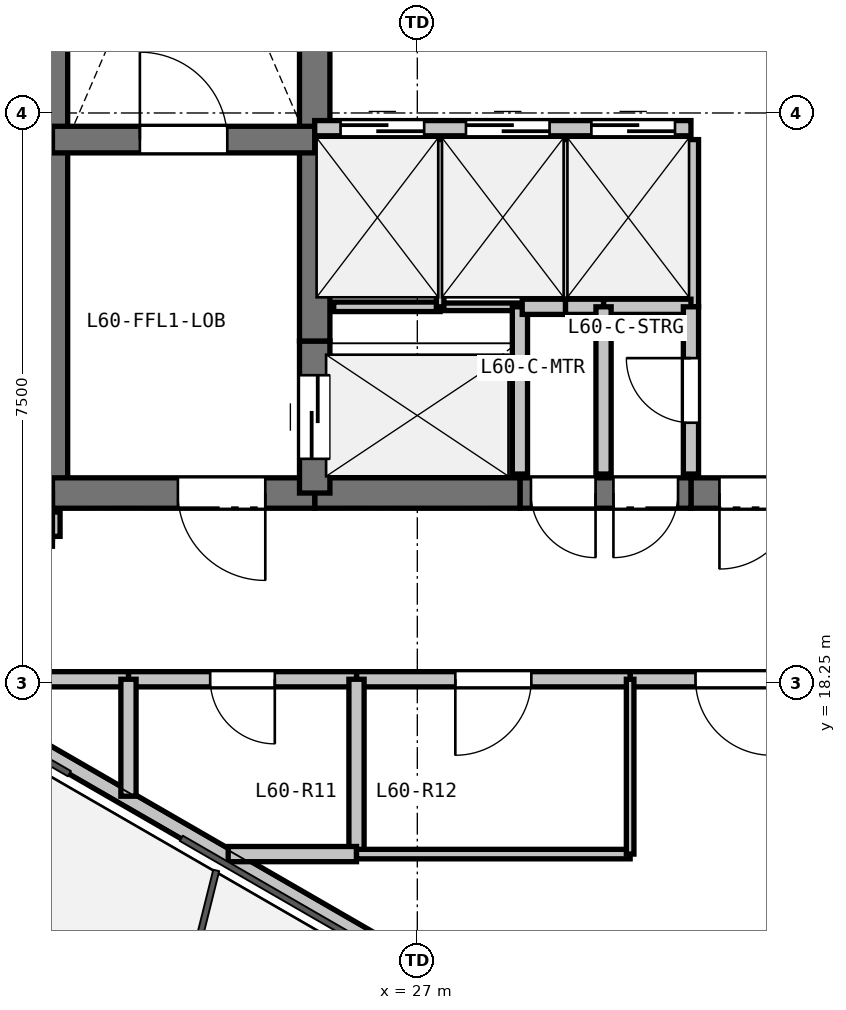
"""IFC4 building model, lengths in metres.
Left out: names, types, materials, properties, quantities, classifications, styles, units other than length and angle.
Written with IfcOpenShell. Run it as: python <this file> out.ifc"""

import sys

from ifc_helpers import new_model, si_unit, direction, frame, frame_2d, origin, place, context, subcontext, project, spatial, rectangle, extrude, element, fill, save


model = new_model("IFC4")
c1 = context("Model", 3, precision=1e-05, world=origin(), true_north=direction((0.0, 1.0)))
c2 = subcontext(c1, "Body", "Model", "MODEL_VIEW")
j1 = project(units=[si_unit("LENGTHUNIT", "METRE"), si_unit("PLANEANGLEUNIT", "RADIAN")], contexts=[c1])
p1 = place(None, origin())
s1 = spatial("IfcSite", under=j1, at=p1, CompositionType="ELEMENT")
p2 = place(p1, origin())
s2 = spatial("IfcBuilding", under=s1, at=p2, CompositionType="ELEMENT")
p3 = place(p2, frame((0.0, 0.0, 215.1)))
s3 = spatial("IfcBuildingStorey", under=s2, at=p3, CompositionType="ELEMENT", Elevation=215.1)
p4 = place(p3, frame((27.102, 14.464, 0.0), z_axis=(0.0, 0.0, 1.0), x_axis=(-0.866020680503, 0.500008180874, 0.0)))
e1 = element("IfcWall", 1, at=p4, inside=s3, PredefinedType="PARAPET", context=c2, shape_type="SweptSolid", body=[
    extrude(rectangle(XDim=8.999, YDim=0.2, at=frame_2d((4.5, 0.0))), origin(), (0.0, 0.0, 1.0), 0.2),
])
p5 = place(p3, frame((22.2, 20.75, 0.0), z_axis=(0.0, 0.0, 1.0), x_axis=(0.0, 1.0, 0.0)))
e2 = element("IfcWall", 2, at=p5, inside=s3, PredefinedType="SHEAR", context=c2, shape_type="SweptSolid", body=[
    extrude(rectangle(XDim=4.65, YDim=0.4, at=frame_2d((2.325, 0.0))), origin(), (0.0, 0.0, 1.0), 3.02),
])
p6 = place(p3, frame((22.2, 25.4, 0.0), z_axis=(0.0, 0.0, 1.0), x_axis=(0.0, 1.0, 0.0)))
e3 = element("IfcWall", 3, at=p6, inside=s3, PredefinedType="SHEAR", context=c2, shape_type="SweptSolid", body=[
    extrude(rectangle(XDim=7.35, YDim=0.4, at=frame_2d((3.675, 0.0))), origin(), (0.0, 0.0, 1.0), 3.02),
])
p7 = place(p3, frame((32.35, 20.75, 0.0), z_axis=(0.0, 0.0, 1.0), x_axis=(-1.0, 0.0, 0.0)))
e4 = element("IfcWall", 4, at=p7, inside=s3, PredefinedType="SHEAR", context=c2, shape_type="SweptSolid", body=[
    extrude(rectangle(XDim=1.75, YDim=0.4, at=frame_2d((0.875, 0.0))), origin(), (0.0, 0.0, 1.0), 3.02),
])
p8 = place(p7, frame((0.375, 0.0, 0.0)))
e5 = element("IfcOpeningElement", 5, at=p8, cuts=e4, PredefinedType="OPENING", context=c2, shape_type="SweptSolid", body=[
    extrude(rectangle(XDim=1.0, YDim=2.15, at=frame_2d((0.5, 1.075))), frame((0.0, 0.21, 0.0), z_axis=(0.0, -1.0, 0.0), x_axis=(1.0, 0.0, 0.0)), (0.0, 0.0, 1.0), 0.42),
])
p9 = place(p3, frame((30.6, 20.75, 0.0), z_axis=(0.0, 0.0, 1.0), x_axis=(-1.0, 0.0, 0.0)))
e6 = element("IfcWall", 6, at=p9, inside=s3, PredefinedType="SHEAR", context=c2, shape_type="SweptSolid", body=[
    extrude(rectangle(XDim=2.25, YDim=0.4, at=frame_2d((1.125, 0.0))), origin(), (0.0, 0.0, 1.0), 3.02),
])
p10 = place(p9, frame((1.255, 0.0, 0.0)))
e7 = element("IfcOpeningElement", 7, at=p10, cuts=e6, PredefinedType="OPENING", context=c2, shape_type="SweptSolid", body=[
    extrude(rectangle(XDim=0.85, YDim=2.1, at=frame_2d((0.425, 1.05))), frame((0.0, 0.21, 0.0), z_axis=(0.0, -1.0, 0.0), x_axis=(1.0, 0.0, 0.0)), (0.0, 0.0, 1.0), 0.42),
])
p11 = place(p9, frame((0.17, 0.0, 0.0)))
e8 = element("IfcOpeningElement", 8, at=p11, cuts=e6, PredefinedType="OPENING", context=c2, shape_type="SweptSolid", body=[
    extrude(rectangle(XDim=0.85, YDim=2.1, at=frame_2d((0.425, 1.05))), frame((0.0, 0.21, 0.0), z_axis=(0.0, -1.0, 0.0), x_axis=(1.0, 0.0, 0.0)), (0.0, 0.0, 1.0), 0.42),
])
p12 = place(p3, frame((28.35, 20.75, 0.0), z_axis=(0.0, 0.0, 1.0), x_axis=(-1.0, 0.0, 0.0)))
e9 = element("IfcWall", 9, at=p12, inside=s3, PredefinedType="SHEAR", context=c2, shape_type="SweptSolid", body=[
    extrude(rectangle(XDim=2.7, YDim=0.4, at=frame_2d((1.35, 0.0))), origin(), (0.0, 0.0, 1.0), 3.02),
])
p13 = place(p3, frame((25.65, 20.75, 0.0), z_axis=(0.0, 0.0, 1.0), x_axis=(-1.0, 0.0, 0.0)))
e10 = element("IfcWall", 10, at=p13, inside=s3, PredefinedType="SHEAR", context=c2, shape_type="SweptSolid", body=[
    extrude(rectangle(XDim=3.45, YDim=0.4, at=frame_2d((1.725, 0.0))), origin(), (0.0, 0.0, 1.0), 3.02),
])
p14 = place(p13, frame((0.65, 0.0, 0.0)))
e11 = element("IfcOpeningElement", 11, at=p14, cuts=e10, PredefinedType="OPENING", context=c2, shape_type="SweptSolid", body=[
    extrude(rectangle(XDim=1.15, YDim=2.15, at=frame_2d((0.575, 1.075))), frame((0.0, 0.21, 0.0), z_axis=(0.0, -1.0, 0.0), x_axis=(1.0, 0.0, 0.0)), (0.0, 0.0, 1.0), 0.42),
])
p15 = place(p3, frame((25.65, 20.75, 0.0), z_axis=(0.0, 0.0, 1.0), x_axis=(0.0, 1.0, 0.0)))
e12 = element("IfcWall", 12, at=p15, inside=s3, PredefinedType="SHEAR", context=c2, shape_type="SweptSolid", body=[
    extrude(rectangle(XDim=2.0, YDim=0.4, at=frame_2d((1.0, 0.0))), origin(), (0.0, 0.0, 1.0), 3.02),
])
p16 = place(p15, frame((0.45, 0.0, 0.0)))
e13 = element("IfcOpeningElement", 13, at=p16, cuts=e12, PredefinedType="OPENING", context=c2, shape_type="SweptSolid", body=[
    extrude(rectangle(XDim=1.1, YDim=2.15, at=frame_2d((0.55, 1.075))), frame((0.0, 0.21, 0.0), z_axis=(0.0, -1.0, 0.0), x_axis=(1.0, 0.0, 0.0)), (0.0, 0.0, 1.0), 0.42),
])
p17 = place(p3, frame((25.65, 22.75, 0.0), z_axis=(0.0, 0.0, 1.0), x_axis=(0.0, 1.0, 0.0)))
e14 = element("IfcWall", 14, at=p17, inside=s3, PredefinedType="SHEAR", context=c2, shape_type="SweptSolid", body=[
    extrude(rectangle(XDim=2.8, YDim=0.4, at=frame_2d((1.4, 0.0))), origin(), (0.0, 0.0, 1.0), 3.02),
])
p18 = place(p3, frame((25.65, 25.55, 0.0), z_axis=(0.0, 0.0, 1.0), x_axis=(0.0, 1.0, 0.0)))
e15 = element("IfcWall", 15, at=p18, inside=s3, PredefinedType="SHEAR", context=c2, shape_type="SweptSolid", body=[
    extrude(rectangle(XDim=2.4, YDim=0.4, at=frame_2d((1.2, 0.0))), origin(), (0.0, 0.0, 1.0), 3.02),
])
p19 = place(p3, frame((22.2, 25.4, 0.0), z_axis=(0.0, 0.0, 1.0), x_axis=(1.0, 0.0, 0.0)))
e16 = element("IfcWall", 16, at=p19, inside=s3, PredefinedType="SHEAR", context=c2, shape_type="SweptSolid", body=[
    extrude(rectangle(XDim=3.45, YDim=0.35, at=frame_2d((1.725, 0.0))), origin(), (0.0, 0.0, 1.0), 3.02),
])
p20 = place(p19, frame((1.15, 0.0, 0.0)))
e17 = element("IfcOpeningElement", 17, at=p20, cuts=e16, PredefinedType="OPENING", context=c2, shape_type="SweptSolid", body=[
    extrude(rectangle(XDim=1.15, YDim=2.15, at=frame_2d((0.575, 1.075))), frame((0.0, 0.185, 0.0), z_axis=(0.0, -1.0, 0.0), x_axis=(1.0, 0.0, 0.0)), (0.0, 0.0, 1.0), 0.37),
])
p21 = place(p3, frame((25.65, 25.55, 0.0), z_axis=(0.0, 0.0, 1.0), x_axis=(1.0, 0.0, 0.0)))
e18 = element("IfcWall", 18, at=p21, inside=s3, PredefinedType="PARTITIONING", context=c2, shape_type="SweptSolid", body=[
    extrude(rectangle(XDim=4.95, YDim=0.2, at=frame_2d((2.475, 0.0))), origin(), (0.0, 0.0, 1.0), 3.02),
])
p22 = place(p21, frame((0.34, 0.0, 0.0)))
e19 = element("IfcOpeningElement", 19, at=p22, cuts=e18, PredefinedType="OPENING", context=c2, shape_type="SweptSolid", body=[
    extrude(rectangle(XDim=1.1, YDim=2.15, at=frame_2d((0.55, 1.075))), frame((0.0, 0.11, 0.0), z_axis=(0.0, -1.0, 0.0), x_axis=(1.0, 0.0, 0.0)), (0.0, 0.0, 1.0), 0.22),
])
p23 = place(p21, frame((1.99, 0.0, 0.0)))
e20 = element("IfcOpeningElement", 20, at=p23, cuts=e18, PredefinedType="OPENING", context=c2, shape_type="SweptSolid", body=[
    extrude(rectangle(XDim=1.1, YDim=2.15, at=frame_2d((0.55, 1.075))), frame((0.0, 0.11, 0.0), z_axis=(0.0, -1.0, 0.0), x_axis=(1.0, 0.0, 0.0)), (0.0, 0.0, 1.0), 0.22),
])
p24 = place(p21, frame((3.64, 0.0, 0.0)))
e21 = element("IfcOpeningElement", 21, at=p24, cuts=e18, PredefinedType="OPENING", context=c2, shape_type="SweptSolid", body=[
    extrude(rectangle(XDim=1.1, YDim=2.15, at=frame_2d((0.55, 1.075))), frame((0.0, 0.11, 0.0), z_axis=(0.0, -1.0, 0.0), x_axis=(1.0, 0.0, 0.0)), (0.0, 0.0, 1.0), 0.22),
])
p25 = place(p3, frame((25.9, 23.2, 0.0), z_axis=(0.0, 0.0, 1.0), x_axis=(1.0, 0.0, 0.0)))
e22 = element("IfcWall", 22, at=p25, inside=s3, PredefinedType="PARTITIONING", context=c2, shape_type="SweptSolid", body=[
    extrude(rectangle(XDim=1.4, YDim=0.125, at=frame_2d((0.7, 0.0))), origin(), (0.0, 0.0, 1.0), 3.02),
])
p26 = place(p3, frame((27.3, 23.2, 0.0), z_axis=(0.0, 0.0, 1.0), x_axis=(1.0, 0.0, 0.0)))
e23 = element("IfcWall", 23, at=p26, inside=s3, PredefinedType="PARTITIONING", context=c2, shape_type="SweptSolid", body=[
    extrude(rectangle(XDim=1.05, YDim=0.1, at=frame_2d((0.525, 0.0))), origin(), (0.0, 0.0, 1.0), 3.02),
])
p27 = place(p3, frame((28.35, 23.2, 0.0), z_axis=(0.0, 0.0, 1.0), x_axis=(0.0, -1.0, 0.0)))
e24 = element("IfcWall", 24, at=p27, inside=s3, PredefinedType="PARTITIONING", context=c2, shape_type="SweptSolid", body=[
    extrude(rectangle(XDim=2.2, YDim=0.2, at=frame_2d((1.1, 0.0))), origin(), (0.0, 0.0, 1.0), 3.02),
])
p28 = place(p3, frame((27.3, 25.4, 0.0), z_axis=(0.0, 0.0, 1.0), x_axis=(0.0, -1.0, 0.0)))
e25 = element("IfcWall", 25, at=p28, inside=s3, PredefinedType="PARTITIONING", context=c2, shape_type="SweptSolid", body=[
    extrude(rectangle(XDim=2.2, YDim=0.1, at=frame_2d((1.1, 0.0))), origin(), (0.0, 0.0, 1.0), 3.02),
])
p29 = place(p3, frame((28.95, 25.4, 0.0), z_axis=(0.0, 0.0, 1.0), x_axis=(0.0, -1.0, 0.0)))
e26 = element("IfcWall", 26, at=p29, inside=s3, PredefinedType="PARTITIONING", context=c2, shape_type="SweptSolid", body=[
    extrude(rectangle(XDim=2.2, YDim=0.125, at=frame_2d((1.1, 0.0))), origin(), (0.0, 0.0, 1.0), 3.02),
])
p30 = place(p3, frame((28.95, 23.2, 0.0), z_axis=(0.0, 0.0, 1.0), x_axis=(-1.0, 0.0, 0.0)))
e27 = element("IfcWall", 27, at=p30, inside=s3, PredefinedType="PARTITIONING", context=c2, shape_type="SweptSolid", body=[
    extrude(rectangle(XDim=0.57, YDim=0.2, at=frame_2d((0.285, 0.0))), origin(), (0.0, 0.0, 1.0), 3.02),
])
p31 = place(p3, frame((30.6, 25.4, 0.0), z_axis=(0.0, 0.0, 1.0), x_axis=(0.0, -1.0, 0.0)))
e28 = element("IfcWall", 28, at=p31, inside=s3, PredefinedType="PARTITIONING", context=c2, shape_type="SweptSolid", body=[
    extrude(rectangle(XDim=2.2, YDim=0.2, at=frame_2d((1.1, 0.0))), origin(), (0.0, 0.0, 1.0), 3.02),
])
p32 = place(p3, frame((30.6, 23.2, 0.0), z_axis=(0.0, 0.0, 1.0), x_axis=(-1.0, 0.0, 0.0)))
e29 = element("IfcWall", 29, at=p32, inside=s3, PredefinedType="PARTITIONING", context=c2, shape_type="SweptSolid", body=[
    extrude(rectangle(XDim=1.15, YDim=0.2, at=frame_2d((0.575, 0.0))), origin(), (0.0, 0.0, 1.0), 3.02),
])
p33 = place(p3, frame((29.45, 23.2, 0.0), z_axis=(0.0, 0.0, 1.0), x_axis=(-1.0, 0.0, 0.0)))
e30 = element("IfcWall", 30, at=p33, inside=s3, PredefinedType="PARTITIONING", context=c2, shape_type="SweptSolid", body=[
    extrude(rectangle(XDim=0.5, YDim=0.2, at=frame_2d((0.25, 0.0))), origin(), (0.0, 0.0, 1.0), 3.02),
])
p34 = place(p3, frame((30.6, 21.0, 0.0), z_axis=(0.0, 0.0, 1.0), x_axis=(0.0, 1.0, 0.0)))
e31 = element("IfcWall", 31, at=p34, inside=s3, PredefinedType="PARTITIONING", context=c2, shape_type="SweptSolid", body=[
    extrude(rectangle(XDim=2.2, YDim=0.2, at=frame_2d((1.1, 0.0))), origin(), (0.0, 0.0, 1.0), 3.02),
])
p35 = place(p34, frame((0.675, 0.0, 0.0)))
e32 = element("IfcOpeningElement", 32, at=p35, cuts=e31, PredefinedType="OPENING", context=c2, shape_type="SweptSolid", body=[
    extrude(rectangle(XDim=0.85, YDim=2.1, at=frame_2d((0.425, 1.05))), frame((0.0, 0.11, 0.0), z_axis=(0.0, -1.0, 0.0), x_axis=(1.0, 0.0, 0.0)), (0.0, 0.0, 1.0), 0.22),
])
p36 = place(p3, frame((21.63, 20.15, 0.0), z_axis=(0.0, 0.0, 1.0), x_axis=(1.0, 0.0, 0.0)))
e33 = element("IfcWall", 33, at=p36, inside=s3, PredefinedType="PARTITIONING", context=c2, shape_type="SweptSolid", body=[
    extrude(rectangle(XDim=0.57, YDim=0.2, at=frame_2d((0.285, 0.0))), origin(), (0.0, 0.0, 1.0), 2.468),
])
p37 = place(p3, frame((22.2, 20.18, 0.0), z_axis=(0.0, 0.0, 1.0), x_axis=(0.0, 1.0, 0.0)))
e34 = element("IfcWall", 34, at=p37, inside=s3, PredefinedType="PARTITIONING", context=c2, shape_type="SweptSolid", body=[
    extrude(rectangle(XDim=0.32, YDim=0.2, at=frame_2d((0.16, 0.0))), origin(), (0.0, 0.0, 1.0), 2.468),
])
p38 = place(p3, frame((32.52, 18.3, 0.0), z_axis=(0.0, 0.0, 1.0), x_axis=(-1.0, 0.0, 0.0)))
e35 = element("IfcWall", 35, at=p38, inside=s3, PredefinedType="PARTITIONING", context=c2, shape_type="SweptSolid", body=[
    extrude(rectangle(XDim=2.72, YDim=0.2, at=frame_2d((1.36, 0.0))), origin(), (0.0, 0.0, 1.0), 3.02),
])
p39 = place(p38, frame((0.86, 0.0, 0.0)))
e36 = element("IfcOpeningElement", 36, at=p39, cuts=e35, PredefinedType="OPENING", context=c2, shape_type="SweptSolid", body=[
    extrude(rectangle(XDim=1.0, YDim=2.15, at=frame_2d((0.5, 1.075))), frame((0.0, 0.11, 0.0), z_axis=(0.0, -1.0, 0.0), x_axis=(1.0, 0.0, 0.0)), (0.0, 0.0, 1.0), 0.22),
])
p40 = place(p3, frame((29.8, 18.3, 0.0), z_axis=(0.0, 0.0, 1.0), x_axis=(-1.0, 0.0, 0.0)))
e37 = element("IfcWall", 37, at=p40, inside=s3, PredefinedType="PARTITIONING", context=c2, shape_type="SweptSolid", body=[
    extrude(rectangle(XDim=3.6, YDim=0.2, at=frame_2d((1.8, 0.0))), origin(), (0.0, 0.0, 1.0), 3.02),
])
p41 = place(p40, frame((1.3, 0.0, 0.0)))
e38 = element("IfcOpeningElement", 38, at=p41, cuts=e37, PredefinedType="OPENING", context=c2, shape_type="SweptSolid", body=[
    extrude(rectangle(XDim=1.0, YDim=2.15, at=frame_2d((0.5, 1.075))), frame((0.0, 0.11, 0.0), z_axis=(0.0, -1.0, 0.0), x_axis=(1.0, 0.0, 0.0)), (0.0, 0.0, 1.0), 0.22),
])
p42 = place(p3, frame((26.2, 18.3, 0.0), z_axis=(0.0, 0.0, 1.0), x_axis=(-1.0, 0.0, 0.0)))
e39 = element("IfcWall", 39, at=p42, inside=s3, PredefinedType="PARTITIONING", context=c2, shape_type="SweptSolid", body=[
    extrude(rectangle(XDim=3.0, YDim=0.2, at=frame_2d((1.5, 0.0))), origin(), (0.0, 0.0, 1.0), 2.468),
])
p43 = place(p42, frame((1.075, 0.0, 0.0)))
e40 = element("IfcOpeningElement", 40, at=p43, cuts=e39, PredefinedType="OPENING", context=c2, shape_type="SweptSolid", body=[
    extrude(rectangle(XDim=0.85, YDim=2.1, at=frame_2d((0.425, 1.05))), frame((0.0, 0.11, 0.0), z_axis=(0.0, -1.0, 0.0), x_axis=(1.0, 0.0, 0.0)), (0.0, 0.0, 1.0), 0.22),
])
p44 = place(p3, frame((23.2, 18.3, 0.0), z_axis=(0.0, 0.0, 1.0), x_axis=(-1.0, 0.0, 0.0)))
e41 = element("IfcWall", 41, at=p44, inside=s3, PredefinedType="PARTITIONING", context=c2, shape_type="SweptSolid", body=[
    extrude(rectangle(XDim=2.672, YDim=0.2, at=frame_2d((1.336, 0.0))), origin(), (0.0, 0.0, 1.0), 2.365),
])
p45 = place(p3, frame((29.45, 23.2, 0.0), z_axis=(0.0, 0.0, 1.0), x_axis=(0.0, -1.0, 0.0)))
e42 = element("IfcWall", 42, at=p45, inside=s3, PredefinedType="PARTITIONING", context=c2, shape_type="SweptSolid", body=[
    extrude(rectangle(XDim=2.2, YDim=0.2, at=frame_2d((1.1, 0.0))), origin(), (0.0, 0.0, 1.0), 3.02),
])
p46 = place(p3, frame((26.2, 18.3, 0.0), z_axis=(0.0, 0.0, 1.0), x_axis=(0.0, -1.0, 0.0)))
e43 = element("IfcWall", 43, at=p46, inside=s3, PredefinedType="PARTITIONING", context=c2, shape_type="SweptSolid", body=[
    extrude(rectangle(XDim=2.3, YDim=0.2, at=frame_2d((1.15, 0.0))), origin(), (0.0, 0.0, 1.0), 2.468),
])
p47 = place(p3, frame((26.2, 16.0, 0.0), z_axis=(0.0, 0.0, 1.0), x_axis=(-1.0, 0.0, 0.0)))
e44 = element("IfcWall", 44, at=p47, inside=s3, PredefinedType="PARTITIONING", context=c2, shape_type="SweptSolid", body=[
    extrude(rectangle(XDim=1.688, YDim=0.2, at=frame_2d((0.844, 0.0))), origin(), (0.0, 0.0, 1.0), 2.365),
])
p48 = place(p3, frame((23.2, 16.761, 0.0), z_axis=(0.0, 0.0, 1.0), x_axis=(0.0, 1.0, 0.0)))
e45 = element("IfcWall", 45, at=p48, inside=s3, PredefinedType="PARTITIONING", context=c2, shape_type="SweptSolid", body=[
    extrude(rectangle(XDim=1.539, YDim=0.2, at=frame_2d((0.769, 0.0))), origin(), (0.0, 0.0, 1.0), 2.365),
])
p49 = place(p3, frame((29.8, 16.0, 0.0), z_axis=(0.0, 0.0, 1.0), x_axis=(-1.0, 0.0, 0.0)))
e46 = element("IfcWall", 46, at=p49, inside=s3, PredefinedType="PARTITIONING", context=c2, shape_type="SweptSolid", body=[
    extrude(rectangle(XDim=3.6, YDim=0.125, at=frame_2d((1.8, 0.0))), origin(), (0.0, 0.0, 1.0), 2.468),
])
p50 = place(p3, frame((29.8, 18.3, 0.0), z_axis=(0.0, 0.0, 1.0), x_axis=(0.0, -1.0, 0.0)))
e47 = element("IfcWall", 47, at=p50, inside=s3, PredefinedType="PARTITIONING", context=c2, shape_type="SweptSolid", body=[
    extrude(rectangle(XDim=2.3, YDim=0.1, at=frame_2d((1.15, 0.0))), origin(), (0.0, 0.0, 1.0), 3.02),
])
p51 = place(p22, origin())
e48 = element("IfcDoor", 48, at=p51, inside=s3, OperationType="SLIDING_TO_LEFT", PredefinedType="DOOR", context=c2, shape_type="SweptSolid", body=[
    extrude(rectangle(XDim=1.1, YDim=2.15, at=frame_2d((0.55, 1.075))), frame((0.0, 0.025, 0.0), z_axis=(0.0, -1.0, 0.0), x_axis=(1.0, 0.0, 0.0)), (0.0, 0.0, 1.0), 0.05),
])
fill(e19, e48)
p52 = place(p23, origin())
e49 = element("IfcDoor", 49, at=p52, inside=s3, OperationType="SLIDING_TO_LEFT", PredefinedType="DOOR", context=c2, shape_type="SweptSolid", body=[
    extrude(rectangle(XDim=1.1, YDim=2.15, at=frame_2d((0.55, 1.075))), frame((0.0, 0.025, 0.0), z_axis=(0.0, -1.0, 0.0), x_axis=(1.0, 0.0, 0.0)), (0.0, 0.0, 1.0), 0.05),
])
fill(e20, e49)
p53 = place(p24, origin())
e50 = element("IfcDoor", 50, at=p53, inside=s3, OperationType="SLIDING_TO_LEFT", PredefinedType="DOOR", context=c2, shape_type="SweptSolid", body=[
    extrude(rectangle(XDim=1.1, YDim=2.15, at=frame_2d((0.55, 1.075))), frame((0.0, 0.025, 0.0), z_axis=(0.0, -1.0, 0.0), x_axis=(1.0, 0.0, 0.0)), (0.0, 0.0, 1.0), 0.05),
])
fill(e21, e50)
p54 = place(p8, origin())
e51 = element("IfcDoor", 51, at=p54, inside=s3, OperationType="SINGLE_SWING_RIGHT", PredefinedType="DOOR", context=c2, shape_type="SweptSolid", body=[
    extrude(rectangle(XDim=1.0, YDim=2.15, at=frame_2d((0.5, 1.075))), frame((0.0, 0.025, 0.0), z_axis=(0.0, -1.0, 0.0), x_axis=(1.0, 0.0, 0.0)), (0.0, 0.0, 1.0), 0.05),
])
fill(e5, e51)
p55 = place(p16, origin())
e52 = element("IfcDoor", 52, at=p55, inside=s3, OperationType="SLIDING_TO_LEFT", PredefinedType="DOOR", context=c2, shape_type="SweptSolid", body=[
    extrude(rectangle(XDim=1.1, YDim=2.15, at=frame_2d((0.55, 1.075))), frame((0.0, 0.025, 0.0), z_axis=(0.0, -1.0, 0.0), x_axis=(1.0, 0.0, 0.0)), (0.0, 0.0, 1.0), 0.05),
])
fill(e13, e52)
p56 = place(p20, origin())
e53 = element("IfcDoor", 53, at=p56, inside=s3, OperationType="SINGLE_SWING_LEFT", PredefinedType="DOOR", context=c2, shape_type="SweptSolid", body=[
    extrude(rectangle(XDim=1.15, YDim=2.15, at=frame_2d((0.575, 1.075))), frame((0.0, 0.025, 0.0), z_axis=(0.0, -1.0, 0.0), x_axis=(1.0, 0.0, 0.0)), (0.0, 0.0, 1.0), 0.05),
])
fill(e17, e53)
p57 = place(p14, origin())
e54 = element("IfcDoor", 54, at=p57, inside=s3, OperationType="SINGLE_SWING_LEFT", PredefinedType="DOOR", context=c2, shape_type="SweptSolid", body=[
    extrude(rectangle(XDim=1.15, YDim=2.15, at=frame_2d((0.575, 1.075))), frame((0.0, 0.025, 0.0), z_axis=(0.0, -1.0, 0.0), x_axis=(1.0, 0.0, 0.0)), (0.0, 0.0, 1.0), 0.05),
])
fill(e11, e54)
p58 = place(p35, origin())
e55 = element("IfcDoor", 55, at=p58, inside=s3, OperationType="SINGLE_SWING_RIGHT", PredefinedType="DOOR", context=c2, shape_type="SweptSolid", body=[
    extrude(rectangle(XDim=0.85, YDim=2.1, at=frame_2d((0.425, 1.05))), frame((0.0, 0.025, 0.0), z_axis=(0.0, -1.0, 0.0), x_axis=(1.0, 0.0, 0.0)), (0.0, 0.0, 1.0), 0.05),
])
fill(e32, e55)
p59 = place(p10, origin())
e56 = element("IfcDoor", 56, at=p59, inside=s3, OperationType="SINGLE_SWING_LEFT", PredefinedType="DOOR", context=c2, shape_type="SweptSolid", body=[
    extrude(rectangle(XDim=0.85, YDim=2.1, at=frame_2d((0.425, 1.05))), frame((0.0, 0.025, 0.0), z_axis=(0.0, -1.0, 0.0), x_axis=(1.0, 0.0, 0.0)), (0.0, 0.0, 1.0), 0.05),
])
fill(e7, e56)
p60 = place(p11, origin())
e57 = element("IfcDoor", 57, at=p60, inside=s3, OperationType="SINGLE_SWING_RIGHT", PredefinedType="DOOR", context=c2, shape_type="SweptSolid", body=[
    extrude(rectangle(XDim=0.85, YDim=2.1, at=frame_2d((0.425, 1.05))), frame((0.0, 0.025, 0.0), z_axis=(0.0, -1.0, 0.0), x_axis=(1.0, 0.0, 0.0)), (0.0, 0.0, 1.0), 0.05),
])
fill(e8, e57)
p61 = place(p43, origin())
e58 = element("IfcDoor", 58, at=p61, inside=s3, OperationType="SINGLE_SWING_LEFT", PredefinedType="DOOR", context=c2, shape_type="SweptSolid", body=[
    extrude(rectangle(XDim=0.85, YDim=2.1, at=frame_2d((0.425, 1.05))), frame((0.0, 0.025, 0.0), z_axis=(0.0, -1.0, 0.0), x_axis=(1.0, 0.0, 0.0)), (0.0, 0.0, 1.0), 0.05),
])
fill(e40, e58)
p62 = place(p41, origin())
e59 = element("IfcDoor", 59, at=p62, inside=s3, OperationType="SINGLE_SWING_RIGHT", PredefinedType="DOOR", context=c2, shape_type="SweptSolid", body=[
    extrude(rectangle(XDim=1.0, YDim=2.15, at=frame_2d((0.5, 1.075))), frame((0.0, 0.025, 0.0), z_axis=(0.0, -1.0, 0.0), x_axis=(1.0, 0.0, 0.0)), (0.0, 0.0, 1.0), 0.05),
])
fill(e38, e59)
p63 = place(p39, origin())
e60 = element("IfcDoor", 60, at=p63, inside=s3, OperationType="SINGLE_SWING_LEFT", PredefinedType="DOOR", context=c2, shape_type="SweptSolid", body=[
    extrude(rectangle(XDim=1.0, YDim=2.15, at=frame_2d((0.5, 1.075))), frame((0.0, 0.025, 0.0), z_axis=(0.0, -1.0, 0.0), x_axis=(1.0, 0.0, 0.0)), (0.0, 0.0, 1.0), 0.05),
])
fill(e36, e60)
save(model, sys.argv[1])
